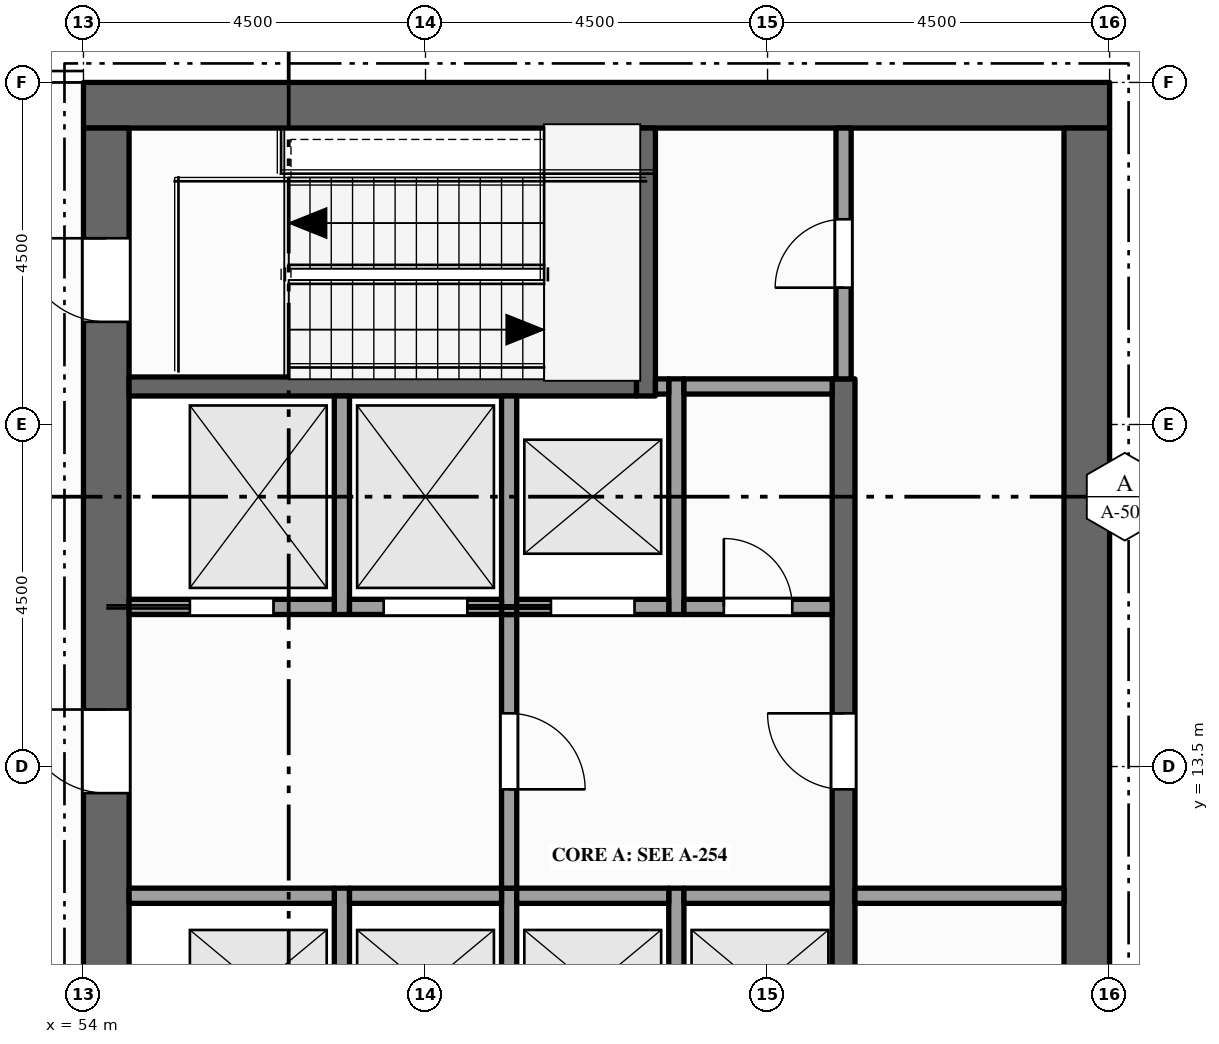
"""IFC4 building model, lengths in metres.
Left out: names, types, materials, properties, quantities, classifications, styles, units other than length and angle.
Written with IfcOpenShell. Run it as: python <this file> out.ifc"""

import sys

from ifc_helpers import new_model, si_unit, direction, frame, frame_2d, origin, place, context, subcontext, project, spatial, rectangle, extrude, element, fill, save


model = new_model("IFC4")
c1 = context("Model", 3, precision=1e-05, world=origin(), true_north=direction((0.0, 1.0)))
c2 = subcontext(c1, "Body", "Model", "MODEL_VIEW")
j1 = project(units=[si_unit("LENGTHUNIT", "METRE"), si_unit("PLANEANGLEUNIT", "RADIAN")], contexts=[c1])
p1 = place(None, origin())
s1 = spatial("IfcSite", under=j1, at=p1, CompositionType="ELEMENT")
p2 = place(p1, origin())
s2 = spatial("IfcBuilding", under=s1, at=p2, CompositionType="ELEMENT")
p3 = place(p2, frame((0.0, 0.0, 305.0)))
s3 = spatial("IfcBuildingStorey", under=s2, at=p3, CompositionType="ELEMENT", Elevation=305.0)
p4 = place(p3, frame((54.0, 22.2, -0.15), z_axis=(0.0, 0.0, 1.0), x_axis=(1.0, 0.0, 0.0)))
e1 = element("IfcWall", 1, at=p4, inside=s3, PredefinedType="SHEAR", context=c2, shape_type="SweptSolid", body=[
    extrude(rectangle(XDim=13.5, YDim=0.6, at=frame_2d((6.75, 0.0))), origin(), (0.0, 0.0, 1.0), 4.5),
])
p5 = place(p3, frame((54.3, 0.6, -0.15), z_axis=(0.0, 0.0, 1.0), x_axis=(0.0, 1.0, 0.0)))
e2 = element("IfcWall", 2, at=p5, inside=s3, PredefinedType="SHEAR", context=c2, shape_type="SweptSolid", body=[
    extrude(rectangle(XDim=21.3, YDim=0.6, at=frame_2d((10.65, 0.0))), origin(), (0.0, 0.0, 1.0), 4.5),
])
p6 = place(p5, frame((6.5, 0.0, 0.15)))
e3 = element("IfcOpeningElement", 3, at=p6, cuts=e2, PredefinedType="OPENING", context=c2, shape_type="SweptSolid", body=[
    extrude(rectangle(XDim=1.8, YDim=2.1, at=frame_2d((0.9, 1.05))), frame((0.0, 0.31, 0.0), z_axis=(0.0, -1.0, 0.0), x_axis=(1.0, 0.0, 0.0)), (0.0, 0.0, 1.0), 0.62),
])
p7 = place(p5, frame((12.55, 0.0, 0.15)))
e4 = element("IfcOpeningElement", 4, at=p7, cuts=e2, PredefinedType="OPENING", context=c2, shape_type="SweptSolid", body=[
    extrude(rectangle(XDim=1.1, YDim=2.1, at=frame_2d((0.55, 1.05))), frame((0.0, 0.31, 0.0), z_axis=(0.0, -1.0, 0.0), x_axis=(1.0, 0.0, 0.0)), (0.0, 0.0, 1.0), 0.62),
])
p8 = place(p5, frame((1.55, 0.0, 0.15)))
e5 = element("IfcOpeningElement", 5, at=p8, cuts=e2, PredefinedType="OPENING", context=c2, shape_type="SweptSolid", body=[
    extrude(rectangle(XDim=1.1, YDim=2.1, at=frame_2d((0.55, 1.05))), frame((0.0, 0.31, 0.0), z_axis=(0.0, -1.0, 0.0), x_axis=(1.0, 0.0, 0.0)), (0.0, 0.0, 1.0), 0.62),
])
p9 = place(p5, frame((18.75, 0.0, 0.15)))
e6 = element("IfcOpeningElement", 6, at=p9, cuts=e2, PredefinedType="OPENING", context=c2, shape_type="SweptSolid", body=[
    extrude(rectangle(XDim=1.1, YDim=2.1, at=frame_2d((0.55, 1.05))), frame((0.0, 0.31, 0.0), z_axis=(0.0, -1.0, 0.0), x_axis=(1.0, 0.0, 0.0)), (0.0, 0.0, 1.0), 0.62),
])
p10 = place(p3, frame((67.2, 0.6, -0.15), z_axis=(0.0, 0.0, 1.0), x_axis=(0.0, 1.0, 0.0)))
e7 = element("IfcWall", 7, at=p10, inside=s3, PredefinedType="SHEAR", context=c2, shape_type="SweptSolid", body=[
    extrude(rectangle(XDim=21.3, YDim=0.6, at=frame_2d((10.65, 0.0))), origin(), (0.0, 0.0, 1.0), 4.5),
])
p11 = place(p3, frame((57.4, 9.3, 0.0), z_axis=(0.0, 0.0, 1.0), x_axis=(0.0, 1.0, 0.0)))
e8 = element("IfcWall", 8, at=p11, inside=s3, PredefinedType="SOLIDWALL", context=c2, shape_type="SweptSolid", body=[
    extrude(rectangle(XDim=2.6, YDim=0.2, at=frame_2d((1.3, 0.0))), origin(), (0.0, 0.0, 1.0), 4.35),
])
p12 = place(p3, frame((57.4, 15.5, 0.0), z_axis=(0.0, 0.0, 1.0), x_axis=(0.0, 1.0, 0.0)))
e9 = element("IfcWall", 9, at=p12, inside=s3, PredefinedType="SOLIDWALL", context=c2, shape_type="SweptSolid", body=[
    extrude(rectangle(XDim=2.875, YDim=0.2, at=frame_2d((1.438, 0.0))), origin(), (0.0, 0.0, 1.0), 4.35),
])
p13 = place(p3, frame((59.6, 9.3, 0.0), z_axis=(0.0, 0.0, 1.0), x_axis=(0.0, 1.0, 0.0)))
e10 = element("IfcWall", 10, at=p13, inside=s3, PredefinedType="SOLIDWALL", context=c2, shape_type="SweptSolid", body=[
    extrude(rectangle(XDim=2.6, YDim=0.2, at=frame_2d((1.3, 0.0))), origin(), (0.0, 0.0, 1.0), 4.35),
])
p14 = place(p3, frame((59.6, 11.9, 0.0), z_axis=(0.0, 0.0, 1.0), x_axis=(0.0, 1.0, 0.0)))
e11 = element("IfcWall", 11, at=p14, inside=s3, PredefinedType="PARTITIONING", context=c2, shape_type="SweptSolid", body=[
    extrude(rectangle(XDim=3.6, YDim=0.2, at=frame_2d((1.8, 0.0))), origin(), (0.0, 0.0, 1.0), 4.35),
])
p15 = place(p14, frame((1.3, 0.0, 0.0)))
e12 = element("IfcOpeningElement", 12, at=p15, cuts=e11, PredefinedType="OPENING", context=c2, shape_type="SweptSolid", body=[
    extrude(rectangle(XDim=1.0, YDim=2.1, at=frame_2d((0.5, 1.05))), frame((0.0, 0.11, 0.0), z_axis=(0.0, -1.0, 0.0), x_axis=(1.0, 0.0, 0.0)), (0.0, 0.0, 1.0), 0.22),
])
p16 = place(p3, frame((59.6, 15.5, 0.0), z_axis=(0.0, 0.0, 1.0), x_axis=(0.0, 1.0, 0.0)))
e13 = element("IfcWall", 13, at=p16, inside=s3, PredefinedType="SOLIDWALL", context=c2, shape_type="SweptSolid", body=[
    extrude(rectangle(XDim=2.875, YDim=0.2, at=frame_2d((1.438, 0.0))), origin(), (0.0, 0.0, 1.0), 4.35),
])
p17 = place(p3, frame((61.4, 18.375, 0.0), z_axis=(0.0, 0.0, 1.0), x_axis=(0.0, 1.0, 0.0)))
e14 = element("IfcWall", 14, at=p17, inside=s3, PredefinedType="SHEAR", context=c2, shape_type="SweptSolid", body=[
    extrude(rectangle(XDim=3.525, YDim=0.25, at=frame_2d((1.762, 0.0))), origin(), (0.0, 0.0, 1.0), 4.35),
])
p18 = place(p3, frame((61.8, 9.3, 0.0), z_axis=(0.0, 0.0, 1.0), x_axis=(0.0, 1.0, 0.0)))
e15 = element("IfcWall", 15, at=p18, inside=s3, PredefinedType="SOLIDWALL", context=c2, shape_type="SweptSolid", body=[
    extrude(rectangle(XDim=2.6, YDim=0.2, at=frame_2d((1.3, 0.0))), origin(), (0.0, 0.0, 1.0), 4.35),
])
p19 = place(p3, frame((61.8, 15.5, 0.0), z_axis=(0.0, 0.0, 1.0), x_axis=(0.0, 1.0, 0.0)))
e16 = element("IfcWall", 16, at=p19, inside=s3, PredefinedType="SOLIDWALL", context=c2, shape_type="SweptSolid", body=[
    extrude(rectangle(XDim=3.1, YDim=0.2, at=frame_2d((1.55, 0.0))), origin(), (0.0, 0.0, 1.0), 4.35),
])
p20 = place(p3, frame((64.0, 4.1, 0.0), z_axis=(0.0, 0.0, 1.0), x_axis=(0.0, 1.0, 0.0)))
e17 = element("IfcWall", 17, at=p20, inside=s3, PredefinedType="SHEAR", context=c2, shape_type="SweptSolid", body=[
    extrude(rectangle(XDim=14.5, YDim=0.3, at=frame_2d((7.25, 0.0))), origin(), (0.0, 0.0, 1.0), 4.35),
])
p21 = place(p20, frame((3.4, 0.0, 0.0)))
e18 = element("IfcOpeningElement", 18, at=p21, cuts=e17, PredefinedType="OPENING", context=c2, shape_type="SweptSolid", body=[
    extrude(rectangle(XDim=1.0, YDim=2.1, at=frame_2d((0.5, 1.05))), frame((0.0, 0.16, 0.0), z_axis=(0.0, -1.0, 0.0), x_axis=(1.0, 0.0, 0.0)), (0.0, 0.0, 1.0), 0.32),
])
p22 = place(p20, frame((9.1, 0.0, 0.0)))
e19 = element("IfcOpeningElement", 19, at=p22, cuts=e17, PredefinedType="OPENING", context=c2, shape_type="SweptSolid", body=[
    extrude(rectangle(XDim=1.0, YDim=2.1, at=frame_2d((0.5, 1.05))), frame((0.0, 0.16, 0.0), z_axis=(0.0, -1.0, 0.0), x_axis=(1.0, 0.0, 0.0)), (0.0, 0.0, 1.0), 0.32),
])
p23 = place(p3, frame((64.0, 18.6, 0.0), z_axis=(0.0, 0.0, 1.0), x_axis=(0.0, 1.0, 0.0)))
e20 = element("IfcWall", 20, at=p23, inside=s3, PredefinedType="PARTITIONING", context=c2, shape_type="SweptSolid", body=[
    extrude(rectangle(XDim=3.3, YDim=0.2, at=frame_2d((1.65, 0.0))), origin(), (0.0, 0.0, 1.0), 4.35),
])
p24 = place(p23, frame((1.2, 0.0, 0.0)))
e21 = element("IfcOpeningElement", 21, at=p24, cuts=e20, PredefinedType="OPENING", context=c2, shape_type="SweptSolid", body=[
    extrude(rectangle(XDim=0.9, YDim=2.1, at=frame_2d((0.45, 1.05))), frame((0.0, 0.11, 0.0), z_axis=(0.0, -1.0, 0.0), x_axis=(1.0, 0.0, 0.0)), (0.0, 0.0, 1.0), 0.22),
])
p25 = place(p3, frame((54.6, 11.8, 0.0), z_axis=(0.0, 0.0, 1.0), x_axis=(1.0, 0.0, 0.0)))
e22 = element("IfcWall", 22, at=p25, inside=s3, PredefinedType="SOLIDWALL", context=c2, shape_type="SweptSolid", body=[
    extrude(rectangle(XDim=2.7, YDim=0.2, at=frame_2d((1.35, 0.0))), origin(), (0.0, 0.0, 1.0), 4.35),
])
for number, where, z_axis, x_axis in (
    (23, (57.5, 11.8, 0.0), (0.0, 0.0, 1.0), (1.0, 0.0, 0.0)),
    (24, (59.7, 11.8, 0.0), (0.0, 0.0, 1.0), (1.0, 0.0, 0.0)),
):
    element("IfcWall", number, at=place(p3, frame(where, z_axis=z_axis, x_axis=x_axis)), inside=s3, PredefinedType="SOLIDWALL", context=c2, shape_type="SweptSolid", body=[
        extrude(rectangle(XDim=2.0, YDim=0.2, at=frame_2d((1.0, 0.0))), origin(), (0.0, 0.0, 1.0), 4.35),
    ])
p26 = place(p3, frame((61.9, 11.8, 0.0), z_axis=(0.0, 0.0, 1.0), x_axis=(1.0, 0.0, 0.0)))
e25 = element("IfcWall", 25, at=p26, inside=s3, PredefinedType="SOLIDWALL", context=c2, shape_type="SweptSolid", body=[
    extrude(rectangle(XDim=1.95, YDim=0.2, at=frame_2d((0.975, 0.0))), origin(), (0.0, 0.0, 1.0), 4.35),
])
p27 = place(p3, frame((64.15, 11.8, 0.0), z_axis=(0.0, 0.0, 1.0), x_axis=(1.0, 0.0, 0.0)))
e26 = element("IfcWall", 26, at=p27, inside=s3, PredefinedType="PARTITIONING", context=c2, shape_type="SweptSolid", body=[
    extrude(rectangle(XDim=2.75, YDim=0.2, at=frame_2d((1.375, 0.0))), origin(), (0.0, 0.0, 1.0), 4.35),
])
p28 = place(p3, frame((54.6, 15.6, 0.0), z_axis=(0.0, 0.0, 1.0), x_axis=(1.0, 0.0, 0.0)))
e27 = element("IfcWall", 27, at=p28, inside=s3, PredefinedType="SOLIDWALL", context=c2, shape_type="SweptSolid", body=[
    extrude(rectangle(XDim=2.7, YDim=0.2, at=frame_2d((1.35, 0.0))), origin(), (0.0, 0.0, 1.0), 4.35),
])
p29 = place(p28, frame((0.8, 0.0, 0.012)))
e28 = element("IfcOpeningElement", 28, at=p29, cuts=e27, PredefinedType="OPENING", context=c2, shape_type="SweptSolid", body=[
    extrude(rectangle(XDim=1.1, YDim=2.1, at=frame_2d((0.55, 1.05))), frame((0.0, 0.11, 0.0), z_axis=(0.0, -1.0, 0.0), x_axis=(1.0, 0.0, 0.0)), (0.0, 0.0, 1.0), 0.22),
])
p30 = place(p3, frame((57.5, 15.6, 0.0), z_axis=(0.0, 0.0, 1.0), x_axis=(1.0, 0.0, 0.0)))
e29 = element("IfcWall", 29, at=p30, inside=s3, PredefinedType="SOLIDWALL", context=c2, shape_type="SweptSolid", body=[
    extrude(rectangle(XDim=2.0, YDim=0.2, at=frame_2d((1.0, 0.0))), origin(), (0.0, 0.0, 1.0), 4.35),
])
p31 = place(p30, frame((0.45, 0.0, 0.012)))
e30 = element("IfcOpeningElement", 30, at=p31, cuts=e29, PredefinedType="OPENING", context=c2, shape_type="SweptSolid", body=[
    extrude(rectangle(XDim=1.1, YDim=2.1, at=frame_2d((0.55, 1.05))), frame((0.0, 0.11, 0.0), z_axis=(0.0, -1.0, 0.0), x_axis=(1.0, 0.0, 0.0)), (0.0, 0.0, 1.0), 0.22),
])
p32 = place(p3, frame((59.7, 15.6, 0.0), z_axis=(0.0, 0.0, 1.0), x_axis=(1.0, 0.0, 0.0)))
e31 = element("IfcWall", 31, at=p32, inside=s3, PredefinedType="SOLIDWALL", context=c2, shape_type="SweptSolid", body=[
    extrude(rectangle(XDim=2.0, YDim=0.2, at=frame_2d((1.0, 0.0))), origin(), (0.0, 0.0, 1.0), 4.35),
])
p33 = place(p32, frame((0.45, 0.0, 0.012)))
e32 = element("IfcOpeningElement", 32, at=p33, cuts=e31, PredefinedType="OPENING", context=c2, shape_type="SweptSolid", body=[
    extrude(rectangle(XDim=1.1, YDim=2.1, at=frame_2d((0.55, 1.05))), frame((0.0, 0.11, 0.0), z_axis=(0.0, -1.0, 0.0), x_axis=(1.0, 0.0, 0.0)), (0.0, 0.0, 1.0), 0.22),
])
p34 = place(p3, frame((61.9, 15.6, 0.0), z_axis=(0.0, 0.0, 1.0), x_axis=(1.0, 0.0, 0.0)))
e33 = element("IfcWall", 33, at=p34, inside=s3, PredefinedType="PARTITIONING", context=c2, shape_type="SweptSolid", body=[
    extrude(rectangle(XDim=1.95, YDim=0.2, at=frame_2d((0.975, 0.0))), origin(), (0.0, 0.0, 1.0), 4.35),
])
p35 = place(p34, frame((0.525, 0.0, 0.0)))
e34 = element("IfcOpeningElement", 34, at=p35, cuts=e33, PredefinedType="OPENING", context=c2, shape_type="SweptSolid", body=[
    extrude(rectangle(XDim=0.9, YDim=2.1, at=frame_2d((0.45, 1.05))), frame((0.0, 0.11, 0.0), z_axis=(0.0, -1.0, 0.0), x_axis=(1.0, 0.0, 0.0)), (0.0, 0.0, 1.0), 0.22),
])
p36 = place(p3, frame((54.6, 18.5, 0.0), z_axis=(0.0, 0.0, 1.0), x_axis=(1.0, 0.0, 0.0)))
e35 = element("IfcWall", 35, at=p36, inside=s3, PredefinedType="SHEAR", context=c2, shape_type="SweptSolid", body=[
    extrude(rectangle(XDim=6.675, YDim=0.25, at=frame_2d((3.337, 0.0))), origin(), (0.0, 0.0, 1.0), 4.35),
])
p37 = place(p3, frame((61.525, 18.5, 0.0), z_axis=(0.0, 0.0, 1.0), x_axis=(1.0, 0.0, 0.0)))
e36 = element("IfcWall", 36, at=p37, inside=s3, PredefinedType="SOLIDWALL", context=c2, shape_type="SweptSolid", body=[
    extrude(rectangle(XDim=0.175, YDim=0.2, at=frame_2d((0.087, 0.0))), origin(), (0.0, 0.0, 1.0), 4.35),
])
p38 = place(p3, frame((61.9, 18.5, 0.0), z_axis=(0.0, 0.0, 1.0), x_axis=(1.0, 0.0, 0.0)))
e37 = element("IfcWall", 37, at=p38, inside=s3, PredefinedType="PARTITIONING", context=c2, shape_type="SweptSolid", body=[
    extrude(rectangle(XDim=1.95, YDim=0.2, at=frame_2d((0.975, 0.0))), origin(), (0.0, 0.0, 1.0), 4.35),
])
p39 = place(p29, origin())
e38 = element("IfcDoor", 38, at=p39, inside=s3, OperationType="SLIDING_TO_LEFT", PredefinedType="DOOR", context=c2, shape_type="SweptSolid", body=[
    extrude(rectangle(XDim=1.1, YDim=2.1, at=frame_2d((0.55, 1.05))), frame((0.0, 0.025, 0.0), z_axis=(0.0, -1.0, 0.0), x_axis=(1.0, 0.0, 0.0)), (0.0, 0.0, 1.0), 0.05),
])
fill(e28, e38)
p40 = place(p31, origin())
e39 = element("IfcDoor", 39, at=p40, inside=s3, OperationType="SLIDING_TO_RIGHT", PredefinedType="DOOR", context=c2, shape_type="SweptSolid", body=[
    extrude(rectangle(XDim=1.1, YDim=2.1, at=frame_2d((0.55, 1.05))), frame((0.0, 0.025, 0.0), z_axis=(0.0, -1.0, 0.0), x_axis=(1.0, 0.0, 0.0)), (0.0, 0.0, 1.0), 0.05),
])
fill(e30, e39)
p41 = place(p33, origin())
e40 = element("IfcDoor", 40, at=p41, inside=s3, OperationType="SLIDING_TO_LEFT", PredefinedType="DOOR", context=c2, shape_type="SweptSolid", body=[
    extrude(rectangle(XDim=1.1, YDim=2.1, at=frame_2d((0.55, 1.05))), frame((0.0, 0.025, 0.0), z_axis=(0.0, -1.0, 0.0), x_axis=(1.0, 0.0, 0.0)), (0.0, 0.0, 1.0), 0.05),
])
fill(e32, e40)
p42 = place(p7, origin())
e41 = element("IfcDoor", 41, at=p42, inside=s3, OperationType="SINGLE_SWING_RIGHT", PredefinedType="DOOR", context=c2, shape_type="SweptSolid", body=[
    extrude(rectangle(XDim=1.1, YDim=2.1, at=frame_2d((0.55, 1.05))), frame((0.0, 0.025, 0.0), z_axis=(0.0, -1.0, 0.0), x_axis=(1.0, 0.0, 0.0)), (0.0, 0.0, 1.0), 0.05),
])
fill(e4, e41)
p43 = place(p15, origin())
e42 = element("IfcDoor", 42, at=p43, inside=s3, OperationType="SINGLE_SWING_LEFT", PredefinedType="DOOR", context=c2, shape_type="SweptSolid", body=[
    extrude(rectangle(XDim=1.0, YDim=2.1, at=frame_2d((0.5, 1.05))), frame((0.0, 0.025, 0.0), z_axis=(0.0, -1.0, 0.0), x_axis=(1.0, 0.0, 0.0)), (0.0, 0.0, 1.0), 0.05),
])
fill(e12, e42)
p44 = place(p22, origin())
e43 = element("IfcDoor", 43, at=p44, inside=s3, OperationType="SINGLE_SWING_RIGHT", PredefinedType="DOOR", context=c2, shape_type="SweptSolid", body=[
    extrude(rectangle(XDim=1.0, YDim=2.1, at=frame_2d((0.5, 1.05))), frame((0.0, 0.025, 0.0), z_axis=(0.0, -1.0, 0.0), x_axis=(1.0, 0.0, 0.0)), (0.0, 0.0, 1.0), 0.05),
])
fill(e19, e43)
p45 = place(p9, origin())
e44 = element("IfcDoor", 44, at=p45, inside=s3, OperationType="SINGLE_SWING_RIGHT", PredefinedType="DOOR", context=c2, shape_type="SweptSolid", body=[
    extrude(rectangle(XDim=1.1, YDim=2.1, at=frame_2d((0.55, 1.05))), frame((0.0, 0.025, 0.0), z_axis=(0.0, -1.0, 0.0), x_axis=(1.0, 0.0, 0.0)), (0.0, 0.0, 1.0), 0.05),
])
fill(e6, e44)
p46 = place(p24, origin())
e45 = element("IfcDoor", 45, at=p46, inside=s3, OperationType="SINGLE_SWING_LEFT", PredefinedType="DOOR", context=c2, shape_type="SweptSolid", body=[
    extrude(rectangle(XDim=0.9, YDim=2.1, at=frame_2d((0.45, 1.05))), frame((0.0, 0.025, 0.0), z_axis=(0.0, -1.0, 0.0), x_axis=(1.0, 0.0, 0.0)), (0.0, 0.0, 1.0), 0.05),
])
fill(e21, e45)
p47 = place(p35, origin())
e46 = element("IfcDoor", 46, at=p47, inside=s3, OperationType="SINGLE_SWING_LEFT", PredefinedType="DOOR", context=c2, shape_type="SweptSolid", body=[
    extrude(rectangle(XDim=0.9, YDim=2.1, at=frame_2d((0.45, 1.05))), frame((0.0, 0.025, 0.0), z_axis=(0.0, -1.0, 0.0), x_axis=(1.0, 0.0, 0.0)), (0.0, 0.0, 1.0), 0.05),
])
fill(e34, e46)
save(model, sys.argv[1])
